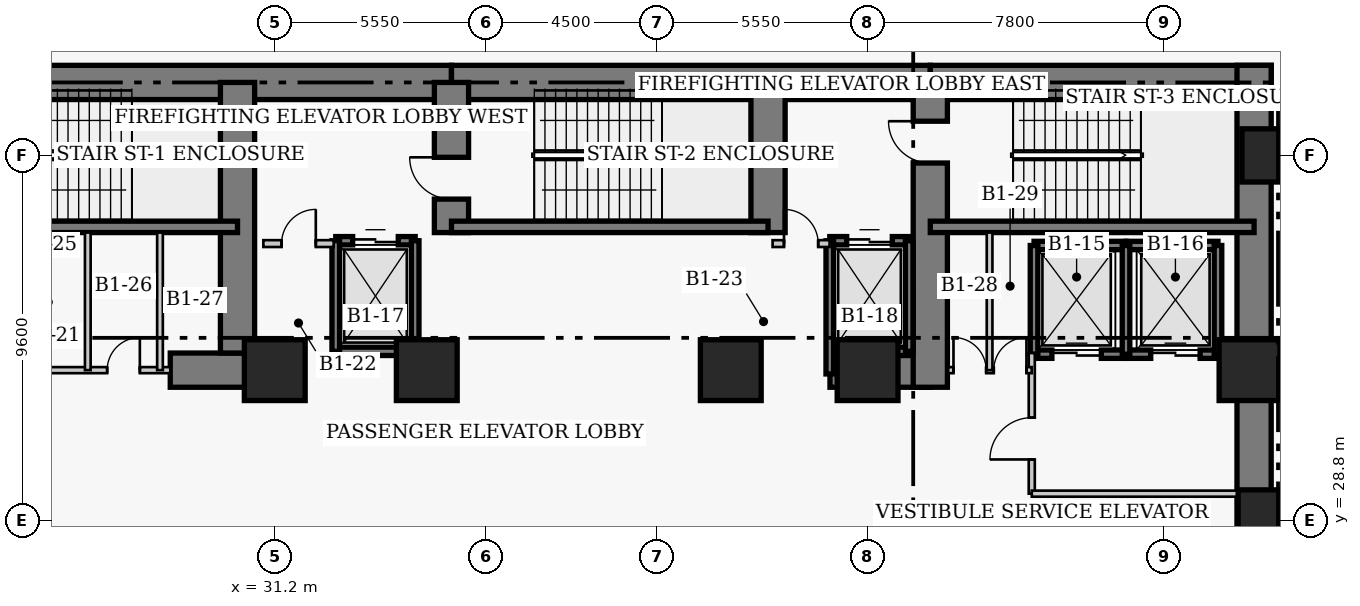
"""IFC4 building model, lengths in metres.
Left out: names, types, materials, properties, quantities, classifications, styles, units other than length and angle.
Written with IfcOpenShell. Run it as: python <this file> out.ifc"""

import sys

from ifc_helpers import new_model, si_unit, direction, frame, frame_2d, origin, origin_2d, place, context, subcontext, project, spatial, rectangle, extrude, element, fill, save


model = new_model("IFC4")
c1 = context("Model", 3, precision=1e-05, world=origin(), true_north=direction((0.0, 1.0)))
c2 = subcontext(c1, "Body", "Model", "MODEL_VIEW")
j1 = project(units=[si_unit("LENGTHUNIT", "METRE"), si_unit("PLANEANGLEUNIT", "RADIAN")], contexts=[c1])
p1 = place(None, origin())
s1 = spatial("IfcSite", under=j1, at=p1, CompositionType="ELEMENT")
p2 = place(p1, origin())
s2 = spatial("IfcBuilding", under=s1, at=p2, CompositionType="ELEMENT")
p3 = place(p2, frame((0.0, 0.0, -4.5)))
s3 = spatial("IfcBuildingStorey", under=s2, at=p3, CompositionType="ELEMENT", Elevation=-4.5)
p4 = place(p3, frame((21.45, 40.32, 0.0), z_axis=(0.0, 0.0, 1.0), x_axis=(1.0, 0.0, 0.0)))
e1 = element("IfcWall", 1, at=p4, inside=s3, PredefinedType="SHEAR", context=c2, shape_type="SweptSolid", body=[
    extrude(rectangle(XDim=14.4, YDim=0.9, at=frame_2d((7.2, 0.0))), origin(), (0.0, 0.0, 1.0), 4.5),
])
p5 = place(p3, frame((35.85, 40.32, 0.0), z_axis=(0.0, 0.0, 1.0), x_axis=(1.0, 0.0, 0.0)))
e2 = element("IfcWall", 2, at=p5, inside=s3, PredefinedType="SHEAR", context=c2, shape_type="SweptSolid", body=[
    extrude(rectangle(XDim=12.6, YDim=0.9, at=frame_2d((6.3, 0.0))), origin(), (0.0, 0.0, 1.0), 4.5),
])
p6 = place(p3, frame((48.45, 40.32, 0.0), z_axis=(0.0, 0.0, 1.0), x_axis=(1.0, 0.0, 0.0)))
e3 = element("IfcWall", 3, at=p6, inside=s3, PredefinedType="SHEAR", context=c2, shape_type="SweptSolid", body=[
    extrude(rectangle(XDim=8.97, YDim=0.9, at=frame_2d((4.485, 0.0))), origin(), (0.0, 0.0, 1.0), 4.5),
])
p7 = place(p3, frame((56.97, 27.05, 0.0), z_axis=(0.0, 0.0, 1.0), x_axis=(0.0, 1.0, 0.0)))
e4 = element("IfcWall", 4, at=p7, inside=s3, PredefinedType="SHEAR", context=c2, shape_type="SweptSolid", body=[
    extrude(rectangle(XDim=13.72, YDim=0.9, at=frame_2d((6.86, 0.0))), origin(), (0.0, 0.0, 1.0), 4.5),
])
p8 = place(p3, frame((28.45, 32.75, 0.0), z_axis=(0.0, 0.0, 1.0), x_axis=(1.0, 0.0, 0.0)))
e5 = element("IfcWall", 5, at=p8, inside=s3, PredefinedType="SHEAR", context=c2, shape_type="SweptSolid", body=[
    extrude(rectangle(XDim=2.4, YDim=0.9, at=frame_2d((1.2, 0.0))), origin(), (0.0, 0.0, 1.0), 4.5),
])
p9 = place(p3, frame((45.81, 32.75, 0.0), z_axis=(0.0, 0.0, 1.0), x_axis=(1.0, 0.0, 0.0)))
e6 = element("IfcWall", 6, at=p9, inside=s3, PredefinedType="SHEAR", context=c2, shape_type="SweptSolid", body=[
    extrude(rectangle(XDim=2.64, YDim=0.9, at=frame_2d((1.32, 0.0))), origin(), (0.0, 0.0, 1.0), 4.5),
])
p10 = place(p3, frame((30.22, 33.2, 0.0), z_axis=(0.0, 0.0, 1.0), x_axis=(0.0, 1.0, 0.0)))
e7 = element("IfcWall", 7, at=p10, inside=s3, PredefinedType="SHEAR", context=c2, shape_type="SweptSolid", body=[
    extrude(rectangle(XDim=7.12, YDim=0.9, at=frame_2d((3.56, 0.0))), origin(), (0.0, 0.0, 1.0), 4.5),
])
p11 = place(p3, frame((35.85, 36.37, 0.0), z_axis=(0.0, 0.0, 1.0), x_axis=(0.0, 1.0, 0.0)))
e8 = element("IfcWall", 8, at=p11, inside=s3, PredefinedType="SHEAR", context=c2, shape_type="SweptSolid", body=[
    extrude(rectangle(XDim=3.95, YDim=0.9, at=frame_2d((1.975, 0.0))), origin(), (0.0, 0.0, 1.0), 4.5),
])
p12 = place(p11, frame((0.88, 0.0, 0.0)))
e9 = element("IfcOpeningElement", 9, at=p12, cuts=e8, PredefinedType="OPENING", context=c2, shape_type="SweptSolid", body=[
    extrude(rectangle(XDim=1.1, YDim=2.15, at=frame_2d((0.55, 1.075))), frame((0.0, 0.46, 0.0), z_axis=(0.0, -1.0, 0.0), x_axis=(1.0, 0.0, 0.0)), (0.0, 0.0, 1.0), 0.92),
])
p13 = place(p3, frame((44.18, 36.37, 0.0), z_axis=(0.0, 0.0, 1.0), x_axis=(0.0, 1.0, 0.0)))
e10 = element("IfcWall", 10, at=p13, inside=s3, PredefinedType="SHEAR", context=c2, shape_type="SweptSolid", body=[
    extrude(rectangle(XDim=3.95, YDim=0.9, at=frame_2d((1.975, 0.0))), origin(), (0.0, 0.0, 1.0), 4.5),
])
p14 = place(p3, frame((48.45, 32.3, 0.0), z_axis=(0.0, 0.0, 1.0), x_axis=(0.0, 1.0, 0.0)))
e11 = element("IfcWall", 11, at=p14, inside=s3, PredefinedType="SHEAR", context=c2, shape_type="SweptSolid", body=[
    extrude(rectangle(XDim=8.02, YDim=0.9, at=frame_2d((4.01, 0.0))), origin(), (0.0, 0.0, 1.0), 4.5),
])
p15 = place(p14, frame((5.9, 0.0, 0.0)))
e12 = element("IfcOpeningElement", 12, at=p15, cuts=e11, PredefinedType="OPENING", context=c2, shape_type="SweptSolid", body=[
    extrude(rectangle(XDim=1.1, YDim=2.15, at=frame_2d((0.55, 1.075))), frame((0.0, 0.46, 0.0), z_axis=(0.0, -1.0, 0.0), x_axis=(1.0, 0.0, 0.0)), (0.0, 0.0, 1.0), 0.92),
])
p16 = place(p3, frame((21.9, 36.52, 0.0), z_axis=(0.0, 0.0, 1.0), x_axis=(1.0, 0.0, 0.0)))
e13 = element("IfcWall", 13, at=p16, inside=s3, PredefinedType="SHEAR", context=c2, shape_type="SweptSolid", body=[
    extrude(rectangle(XDim=8.32, YDim=0.3, at=frame_2d((4.16, 0.0))), origin(), (0.0, 0.0, 1.0), 4.5),
])
p17 = place(p16, frame((0.9, 0.0, 0.0)))
e14 = element("IfcOpeningElement", 14, at=p17, cuts=e13, PredefinedType="OPENING", context=c2, shape_type="SweptSolid", body=[
    extrude(rectangle(XDim=1.1, YDim=2.15, at=frame_2d((0.55, 1.075))), frame((0.0, 0.16, 0.0), z_axis=(0.0, -1.0, 0.0), x_axis=(1.0, 0.0, 0.0)), (0.0, 0.0, 1.0), 0.32),
])
p18 = place(p3, frame((35.85, 36.52, 0.0), z_axis=(0.0, 0.0, 1.0), x_axis=(1.0, 0.0, 0.0)))
e15 = element("IfcWall", 15, at=p18, inside=s3, PredefinedType="SHEAR", context=c2, shape_type="SweptSolid", body=[
    extrude(rectangle(XDim=8.33, YDim=0.3, at=frame_2d((4.165, 0.0))), origin(), (0.0, 0.0, 1.0), 4.5),
])
p19 = place(p3, frame((48.45, 36.52, 0.0), z_axis=(0.0, 0.0, 1.0), x_axis=(1.0, 0.0, 0.0)))
e16 = element("IfcWall", 16, at=p19, inside=s3, PredefinedType="SHEAR", context=c2, shape_type="SweptSolid", body=[
    extrude(rectangle(XDim=8.52, YDim=0.3, at=frame_2d((4.26, 0.0))), origin(), (0.0, 0.0, 1.0), 4.5),
])
p20 = place(p3, frame((57.35, 28.8, 0.0), z_axis=(0.0, 0.0, 1.0), x_axis=(1.0, 0.0, 0.0)))
e17 = element("IfcColumn", 17, at=p20, inside=s3, PredefinedType="COLUMN", context=c2, shape_type="SweptSolid", body=[
    extrude(rectangle(XDim=1.6, YDim=1.6, at=origin_2d()), origin(), (0.0, 0.0, 1.0), 4.5),
])
p21 = place(p3, frame((57.35, 38.4, 0.0), z_axis=(0.0, 0.0, 1.0), x_axis=(1.0, 0.0, 0.0)))
e18 = element("IfcColumn", 18, at=p21, inside=s3, PredefinedType="COLUMN", context=c2, shape_type="SweptSolid", body=[
    extrude(rectangle(XDim=1.4, YDim=1.4, at=origin_2d()), origin(), (0.0, 0.0, 1.0), 4.5),
])
for number, where, z_axis, x_axis in (
    (19, (31.2, 32.75, 0.0), (0.0, 0.0, 1.0), (1.0, 0.0, 0.0)),
    (20, (35.2, 32.75, 0.0), (0.0, 0.0, 1.0), (1.0, 0.0, 0.0)),
    (21, (43.2, 32.75, 0.0), (0.0, 0.0, 1.0), (1.0, 0.0, 0.0)),
    (22, (46.8, 32.75, 0.0), (0.0, 0.0, 1.0), (1.0, 0.0, 0.0)),
    (23, (56.85, 32.75, 0.0), (0.0, 0.0, 1.0), (1.0, 0.0, 0.0)),
):
    element("IfcColumn", number, at=place(p3, frame(where, z_axis=z_axis, x_axis=x_axis)), inside=s3, PredefinedType="COLUMN", context=c2, shape_type="SweptSolid", body=[
        extrude(rectangle(XDim=1.6, YDim=1.6, at=origin_2d()), origin(), (0.0, 0.0, 1.0), 4.5),
    ])
p22 = place(p3, frame((51.18, 36.03, 0.0), z_axis=(0.0, 0.0, 1.0), x_axis=(1.0, 0.0, 0.0)))
e24 = element("IfcWall", 24, at=p22, inside=s3, PredefinedType="SHEAR", context=c2, shape_type="SweptSolid", body=[
    extrude(rectangle(XDim=2.42, YDim=0.22, at=frame_2d((1.21, 0.0))), origin(), (0.0, 0.0, 1.0), 4.5),
])
p23 = place(p3, frame((51.18, 33.17, 0.0), z_axis=(0.0, 0.0, 1.0), x_axis=(1.0, 0.0, 0.0)))
e25 = element("IfcWall", 25, at=p23, inside=s3, PredefinedType="SHEAR", context=c2, shape_type="SweptSolid", body=[
    extrude(rectangle(XDim=2.42, YDim=0.22, at=frame_2d((1.21, 0.0))), origin(), (0.0, 0.0, 1.0), 4.5),
])
p24 = place(p23, frame((0.47, 0.0, 0.0)))
e26 = element("IfcOpeningElement", 26, at=p24, cuts=e25, PredefinedType="OPENING", context=c2, shape_type="SweptSolid", body=[
    extrude(rectangle(XDim=1.3, YDim=2.15, at=frame_2d((0.65, 1.075))), frame((0.0, 0.12, 0.0), z_axis=(0.0, -1.0, 0.0), x_axis=(1.0, 0.0, 0.0)), (0.0, 0.0, 1.0), 0.24),
])
p25 = place(p3, frame((51.18, 33.17, 0.0), z_axis=(0.0, 0.0, 1.0), x_axis=(0.0, 1.0, 0.0)))
e27 = element("IfcWall", 27, at=p25, inside=s3, PredefinedType="SHEAR", context=c2, shape_type="SweptSolid", body=[
    extrude(rectangle(XDim=2.86, YDim=0.2, at=frame_2d((1.43, 0.0))), origin(), (0.0, 0.0, 1.0), 4.5),
])
p26 = place(p3, frame((53.6, 36.03, 0.0), z_axis=(0.0, 0.0, 1.0), x_axis=(1.0, 0.0, 0.0)))
e28 = element("IfcWall", 28, at=p26, inside=s3, PredefinedType="SHEAR", context=c2, shape_type="SweptSolid", body=[
    extrude(rectangle(XDim=2.42, YDim=0.22, at=frame_2d((1.21, 0.0))), origin(), (0.0, 0.0, 1.0), 4.5),
])
p27 = place(p3, frame((53.6, 33.17, 0.0), z_axis=(0.0, 0.0, 1.0), x_axis=(1.0, 0.0, 0.0)))
e29 = element("IfcWall", 29, at=p27, inside=s3, PredefinedType="SHEAR", context=c2, shape_type="SweptSolid", body=[
    extrude(rectangle(XDim=2.42, YDim=0.22, at=frame_2d((1.21, 0.0))), origin(), (0.0, 0.0, 1.0), 4.5),
])
p28 = place(p27, frame((0.65, 0.0, 0.0)))
e30 = element("IfcOpeningElement", 30, at=p28, cuts=e29, PredefinedType="OPENING", context=c2, shape_type="SweptSolid", body=[
    extrude(rectangle(XDim=1.3, YDim=2.15, at=frame_2d((0.65, 1.075))), frame((0.0, 0.12, 0.0), z_axis=(0.0, -1.0, 0.0), x_axis=(1.0, 0.0, 0.0)), (0.0, 0.0, 1.0), 0.24),
])
for number, where, z_axis, x_axis in (
    (31, (53.6, 33.17, 0.0), (0.0, 0.0, 1.0), (0.0, 1.0, 0.0)),
    (32, (56.02, 33.17, 0.0), (0.0, 0.0, 1.0), (0.0, 1.0, 0.0)),
):
    element("IfcWall", number, at=place(p3, frame(where, z_axis=z_axis, x_axis=x_axis)), inside=s3, PredefinedType="SHEAR", context=c2, shape_type="SweptSolid", body=[
        extrude(rectangle(XDim=2.86, YDim=0.2, at=frame_2d((1.43, 0.0))), origin(), (0.0, 0.0, 1.0), 4.5),
    ])
p29 = place(p3, frame((32.805, 36.155, 0.0), z_axis=(0.0, 0.0, 1.0), x_axis=(1.0, 0.0, 0.0)))
e33 = element("IfcWall", 33, at=p29, inside=s3, PredefinedType="SHEAR", context=c2, shape_type="SweptSolid", body=[
    extrude(rectangle(XDim=2.09, YDim=0.22, at=frame_2d((1.045, 0.0))), origin(), (0.0, 0.0, 1.0), 4.5),
])
p30 = place(p29, frame((0.445, 0.0, 0.0)))
e34 = element("IfcOpeningElement", 34, at=p30, cuts=e33, PredefinedType="OPENING", context=c2, shape_type="SweptSolid", body=[
    extrude(rectangle(XDim=1.2, YDim=2.15, at=frame_2d((0.6, 1.075))), frame((0.0, 0.12, 0.0), z_axis=(0.0, -1.0, 0.0), x_axis=(1.0, 0.0, 0.0)), (0.0, 0.0, 1.0), 0.24),
])
p31 = place(p3, frame((32.805, 33.245, 0.0), z_axis=(0.0, 0.0, 1.0), x_axis=(1.0, 0.0, 0.0)))
e35 = element("IfcWall", 35, at=p31, inside=s3, PredefinedType="SHEAR", context=c2, shape_type="SweptSolid", body=[
    extrude(rectangle(XDim=2.09, YDim=0.22, at=frame_2d((1.045, 0.0))), origin(), (0.0, 0.0, 1.0), 4.5),
])
for number, where, z_axis, x_axis in (
    (36, (32.805, 33.245, 0.0), (0.0, 0.0, 1.0), (0.0, 1.0, 0.0)),
    (37, (34.895, 33.245, 0.0), (0.0, 0.0, 1.0), (0.0, 1.0, 0.0)),
):
    element("IfcWall", number, at=place(p3, frame(where, z_axis=z_axis, x_axis=x_axis)), inside=s3, PredefinedType="SHEAR", context=c2, shape_type="SweptSolid", body=[
        extrude(rectangle(XDim=2.91, YDim=0.2, at=frame_2d((1.455, 0.0))), origin(), (0.0, 0.0, 1.0), 4.5),
    ])
p32 = place(p3, frame((45.805, 36.155, 0.0), z_axis=(0.0, 0.0, 1.0), x_axis=(1.0, 0.0, 0.0)))
e38 = element("IfcWall", 38, at=p32, inside=s3, PredefinedType="SHEAR", context=c2, shape_type="SweptSolid", body=[
    extrude(rectangle(XDim=2.09, YDim=0.22, at=frame_2d((1.045, 0.0))), origin(), (0.0, 0.0, 1.0), 4.5),
])
p33 = place(p32, frame((0.445, 0.0, 0.0)))
e39 = element("IfcOpeningElement", 39, at=p33, cuts=e38, PredefinedType="OPENING", context=c2, shape_type="SweptSolid", body=[
    extrude(rectangle(XDim=1.2, YDim=2.15, at=frame_2d((0.6, 1.075))), frame((0.0, 0.12, 0.0), z_axis=(0.0, -1.0, 0.0), x_axis=(1.0, 0.0, 0.0)), (0.0, 0.0, 1.0), 0.24),
])
p34 = place(p3, frame((45.805, 33.245, 0.0), z_axis=(0.0, 0.0, 1.0), x_axis=(1.0, 0.0, 0.0)))
e40 = element("IfcWall", 40, at=p34, inside=s3, PredefinedType="SHEAR", context=c2, shape_type="SweptSolid", body=[
    extrude(rectangle(XDim=2.09, YDim=0.22, at=frame_2d((1.045, 0.0))), origin(), (0.0, 0.0, 1.0), 4.5),
])
p35 = place(p3, frame((45.805, 32.65, 0.0), z_axis=(0.0, 0.0, 1.0), x_axis=(0.0, 1.0, 0.0)))
e41 = element("IfcWall", 41, at=p35, inside=s3, PredefinedType="SHEAR", context=c2, shape_type="SweptSolid", body=[
    extrude(rectangle(XDim=3.505, YDim=0.2, at=frame_2d((1.752, 0.0))), origin(), (0.0, 0.0, 1.0), 4.5),
])
p36 = place(p3, frame((47.895, 33.245, 0.0), z_axis=(0.0, 0.0, 1.0), x_axis=(0.0, 1.0, 0.0)))
e42 = element("IfcWall", 42, at=p36, inside=s3, PredefinedType="SHEAR", context=c2, shape_type="SweptSolid", body=[
    extrude(rectangle(XDim=2.91, YDim=0.2, at=frame_2d((1.455, 0.0))), origin(), (0.0, 0.0, 1.0), 4.5),
])
p37 = place(p3, frame((30.9, 36.08, 0.0), z_axis=(0.0, 0.0, 1.0), x_axis=(1.0, 0.0, 0.0)))
e43 = element("IfcWall", 43, at=p37, inside=s3, PredefinedType="PARTITIONING", context=c2, shape_type="SweptSolid", body=[
    extrude(rectangle(XDim=1.85, YDim=0.18, at=frame_2d((0.925, 0.0))), origin(), (0.0, 0.0, 1.0), 4.15),
])
p38 = place(p37, frame((0.48, 0.0, 0.0)))
e44 = element("IfcOpeningElement", 44, at=p38, cuts=e43, PredefinedType="OPENING", context=c2, shape_type="SweptSolid", body=[
    extrude(rectangle(XDim=0.9, YDim=2.15, at=frame_2d((0.45, 1.075))), frame((0.0, 0.1, 0.0), z_axis=(0.0, -1.0, 0.0), x_axis=(1.0, 0.0, 0.0)), (0.0, 0.0, 1.0), 0.2),
])
p39 = place(p3, frame((44.3, 36.08, 0.0), z_axis=(0.0, 0.0, 1.0), x_axis=(1.0, 0.0, 0.0)))
e45 = element("IfcWall", 45, at=p39, inside=s3, PredefinedType="PARTITIONING", context=c2, shape_type="SweptSolid", body=[
    extrude(rectangle(XDim=1.5, YDim=0.18, at=frame_2d((0.75, 0.0))), origin(), (0.0, 0.0, 1.0), 4.15),
])
p40 = place(p39, frame((0.3, 0.0, 0.0)))
e46 = element("IfcOpeningElement", 46, at=p40, cuts=e45, PredefinedType="OPENING", context=c2, shape_type="SweptSolid", body=[
    extrude(rectangle(XDim=0.9, YDim=2.15, at=frame_2d((0.45, 1.075))), frame((0.0, 0.1, 0.0), z_axis=(0.0, -1.0, 0.0), x_axis=(1.0, 0.0, 0.0)), (0.0, 0.0, 1.0), 0.2),
])
p41 = place(p3, frame((51.12, 29.5, 0.0), z_axis=(0.0, 0.0, 1.0), x_axis=(0.0, 1.0, 0.0)))
e47 = element("IfcWall", 47, at=p41, inside=s3, PredefinedType="PARTITIONING", context=c2, shape_type="SweptSolid", body=[
    extrude(rectangle(XDim=3.7, YDim=0.16, at=frame_2d((1.85, 0.0))), origin(), (0.0, 0.0, 1.0), 4.15),
])
p42 = place(p41, frame((0.9, 0.0, 0.0)))
e48 = element("IfcOpeningElement", 48, at=p42, cuts=e47, PredefinedType="OPENING", context=c2, shape_type="SweptSolid", body=[
    extrude(rectangle(XDim=1.1, YDim=2.15, at=frame_2d((0.55, 1.075))), frame((0.0, 0.09, 0.0), z_axis=(0.0, -1.0, 0.0), x_axis=(1.0, 0.0, 0.0)), (0.0, 0.0, 1.0), 0.18),
])
p43 = place(p3, frame((51.12, 29.5, 0.0), z_axis=(0.0, 0.0, 1.0), x_axis=(1.0, 0.0, 0.0)))
e49 = element("IfcWall", 49, at=p43, inside=s3, PredefinedType="PARTITIONING", context=c2, shape_type="SweptSolid", body=[
    extrude(rectangle(XDim=5.63, YDim=0.16, at=frame_2d((2.815, 0.0))), origin(), (0.0, 0.0, 1.0), 4.15),
])
p44 = place(p3, frame((24.48, 32.75, 0.0), z_axis=(0.0, 0.0, 1.0), x_axis=(1.0, 0.0, 0.0)))
e50 = element("IfcWall", 50, at=p44, inside=s3, PredefinedType="PARTITIONING", context=c2, shape_type="SweptSolid", body=[
    extrude(rectangle(XDim=3.97, YDim=0.16, at=frame_2d((1.985, 0.0))), origin(), (0.0, 0.0, 1.0), 4.15),
])
p45 = place(p44, frame((2.31, 0.0, 0.0)))
e51 = element("IfcOpeningElement", 51, at=p45, cuts=e50, PredefinedType="OPENING", context=c2, shape_type="SweptSolid", body=[
    extrude(rectangle(XDim=0.86, YDim=2.05, at=frame_2d((0.43, 1.025))), frame((0.0, 0.09, 0.0), z_axis=(0.0, -1.0, 0.0), x_axis=(1.0, 0.0, 0.0)), (0.0, 0.0, 1.0), 0.18),
])
p46 = place(p3, frame((48.92, 32.75, 0.0), z_axis=(0.0, 0.0, 1.0), x_axis=(1.0, 0.0, 0.0)))
e52 = element("IfcWall", 52, at=p46, inside=s3, PredefinedType="PARTITIONING", context=c2, shape_type="SweptSolid", body=[
    extrude(rectangle(XDim=2.2, YDim=0.16, at=frame_2d((1.1, 0.0))), origin(), (0.0, 0.0, 1.0), 4.15),
])
p47 = place(p46, frame((0.14, 0.0, 0.0)))
e53 = element("IfcOpeningElement", 53, at=p47, cuts=e52, PredefinedType="OPENING", context=c2, shape_type="SweptSolid", body=[
    extrude(rectangle(XDim=0.86, YDim=2.05, at=frame_2d((0.43, 1.025))), frame((0.0, 0.09, 0.0), z_axis=(0.0, -1.0, 0.0), x_axis=(1.0, 0.0, 0.0)), (0.0, 0.0, 1.0), 0.18),
])
p48 = place(p46, frame((1.2, 0.0, 0.0)))
e54 = element("IfcOpeningElement", 54, at=p48, cuts=e52, PredefinedType="OPENING", context=c2, shape_type="SweptSolid", body=[
    extrude(rectangle(XDim=0.86, YDim=2.05, at=frame_2d((0.43, 1.025))), frame((0.0, 0.09, 0.0), z_axis=(0.0, -1.0, 0.0), x_axis=(1.0, 0.0, 0.0)), (0.0, 0.0, 1.0), 0.18),
])
for number, where, z_axis, x_axis in (
    (55, (26.28, 32.75, 0.0), (0.0, 0.0, 1.0), (0.0, 1.0, 0.0)),
    (56, (28.18, 32.75, 0.0), (0.0, 0.0, 1.0), (0.0, 1.0, 0.0)),
    (57, (50.01, 32.75, 0.0), (0.0, 0.0, 1.0), (0.0, 1.0, 0.0)),
):
    element("IfcWall", number, at=place(p3, frame(where, z_axis=z_axis, x_axis=x_axis)), inside=s3, PredefinedType="PARTITIONING", context=c2, shape_type="SweptSolid", body=[
        extrude(rectangle(XDim=3.62, YDim=0.15, at=frame_2d((1.81, 0.0))), origin(), (0.0, 0.0, 1.0), 4.15),
    ])
p49 = place(p24, origin())
e58 = element("IfcDoor", 58, at=p49, inside=s3, OperationType="DOUBLE_DOOR_SLIDING", PredefinedType="DOOR", context=c2, shape_type="SweptSolid", body=[
    extrude(rectangle(XDim=1.3, YDim=2.15, at=frame_2d((0.65, 1.075))), frame((0.0, 0.025, 0.0), z_axis=(0.0, -1.0, 0.0), x_axis=(1.0, 0.0, 0.0)), (0.0, 0.0, 1.0), 0.05),
])
fill(e26, e58)
p50 = place(p28, origin())
e59 = element("IfcDoor", 59, at=p50, inside=s3, OperationType="DOUBLE_DOOR_SLIDING", PredefinedType="DOOR", context=c2, shape_type="SweptSolid", body=[
    extrude(rectangle(XDim=1.3, YDim=2.15, at=frame_2d((0.65, 1.075))), frame((0.0, 0.025, 0.0), z_axis=(0.0, -1.0, 0.0), x_axis=(1.0, 0.0, 0.0)), (0.0, 0.0, 1.0), 0.05),
])
fill(e30, e59)
p51 = place(p30, origin())
e60 = element("IfcDoor", 60, at=p51, inside=s3, OperationType="DOUBLE_DOOR_SLIDING", PredefinedType="DOOR", context=c2, shape_type="SweptSolid", body=[
    extrude(rectangle(XDim=1.2, YDim=2.15, at=frame_2d((0.6, 1.075))), frame((0.0, 0.025, 0.0), z_axis=(0.0, -1.0, 0.0), x_axis=(1.0, 0.0, 0.0)), (0.0, 0.0, 1.0), 0.05),
])
fill(e34, e60)
p52 = place(p33, origin())
e61 = element("IfcDoor", 61, at=p52, inside=s3, OperationType="DOUBLE_DOOR_SLIDING", PredefinedType="DOOR", context=c2, shape_type="SweptSolid", body=[
    extrude(rectangle(XDim=1.2, YDim=2.15, at=frame_2d((0.6, 1.075))), frame((0.0, 0.025, 0.0), z_axis=(0.0, -1.0, 0.0), x_axis=(1.0, 0.0, 0.0)), (0.0, 0.0, 1.0), 0.05),
])
fill(e39, e61)
p53 = place(p38, origin())
e62 = element("IfcDoor", 62, at=p53, inside=s3, OperationType="SINGLE_SWING_RIGHT", PredefinedType="DOOR", context=c2, shape_type="SweptSolid", body=[
    extrude(rectangle(XDim=0.9, YDim=2.15, at=frame_2d((0.45, 1.075))), frame((0.0, 0.025, 0.0), z_axis=(0.0, -1.0, 0.0), x_axis=(1.0, 0.0, 0.0)), (0.0, 0.0, 1.0), 0.05),
])
fill(e44, e62)
p54 = place(p40, origin())
e63 = element("IfcDoor", 63, at=p54, inside=s3, OperationType="SINGLE_SWING_LEFT", PredefinedType="DOOR", context=c2, shape_type="SweptSolid", body=[
    extrude(rectangle(XDim=0.9, YDim=2.15, at=frame_2d((0.45, 1.075))), frame((0.0, 0.025, 0.0), z_axis=(0.0, -1.0, 0.0), x_axis=(1.0, 0.0, 0.0)), (0.0, 0.0, 1.0), 0.05),
])
fill(e46, e63)
p55 = place(p42, origin())
e64 = element("IfcDoor", 64, at=p55, inside=s3, OperationType="SINGLE_SWING_LEFT", PredefinedType="DOOR", context=c2, shape_type="SweptSolid", body=[
    extrude(rectangle(XDim=1.1, YDim=2.15, at=frame_2d((0.55, 1.075))), frame((0.0, 0.025, 0.0), z_axis=(0.0, -1.0, 0.0), x_axis=(1.0, 0.0, 0.0)), (0.0, 0.0, 1.0), 0.05),
])
fill(e48, e64)
p56 = place(p45, origin())
e65 = element("IfcDoor", 65, at=p56, inside=s3, OperationType="SINGLE_SWING_RIGHT", PredefinedType="DOOR", context=c2, shape_type="SweptSolid", body=[
    extrude(rectangle(XDim=0.86, YDim=2.05, at=frame_2d((0.43, 1.025))), frame((0.0, 0.025, 0.0), z_axis=(0.0, -1.0, 0.0), x_axis=(1.0, 0.0, 0.0)), (0.0, 0.0, 1.0), 0.05),
])
fill(e51, e65)
p57 = place(p47, origin())
e66 = element("IfcDoor", 66, at=p57, inside=s3, OperationType="SINGLE_SWING_LEFT", PredefinedType="DOOR", context=c2, shape_type="SweptSolid", body=[
    extrude(rectangle(XDim=0.86, YDim=2.05, at=frame_2d((0.43, 1.025))), frame((0.0, 0.025, 0.0), z_axis=(0.0, -1.0, 0.0), x_axis=(1.0, 0.0, 0.0)), (0.0, 0.0, 1.0), 0.05),
])
fill(e53, e66)
p58 = place(p48, origin())
e67 = element("IfcDoor", 67, at=p58, inside=s3, OperationType="SINGLE_SWING_RIGHT", PredefinedType="DOOR", context=c2, shape_type="SweptSolid", body=[
    extrude(rectangle(XDim=0.86, YDim=2.05, at=frame_2d((0.43, 1.025))), frame((0.0, 0.025, 0.0), z_axis=(0.0, -1.0, 0.0), x_axis=(1.0, 0.0, 0.0)), (0.0, 0.0, 1.0), 0.05),
])
fill(e54, e67)
p59 = place(p12, origin())
e68 = element("IfcDoor", 68, at=p59, inside=s3, OperationType="SINGLE_SWING_RIGHT", PredefinedType="DOOR", context=c2, shape_type="SweptSolid", body=[
    extrude(rectangle(XDim=1.1, YDim=2.15, at=frame_2d((0.55, 1.075))), frame((0.0, 0.025, 0.0), z_axis=(0.0, -1.0, 0.0), x_axis=(1.0, 0.0, 0.0)), (0.0, 0.0, 1.0), 0.05),
])
fill(e9, e68)
p60 = place(p15, origin())
e69 = element("IfcDoor", 69, at=p60, inside=s3, OperationType="SINGLE_SWING_RIGHT", PredefinedType="DOOR", context=c2, shape_type="SweptSolid", body=[
    extrude(rectangle(XDim=1.1, YDim=2.15, at=frame_2d((0.55, 1.075))), frame((0.0, 0.025, 0.0), z_axis=(0.0, -1.0, 0.0), x_axis=(1.0, 0.0, 0.0)), (0.0, 0.0, 1.0), 0.05),
])
fill(e12, e69)
save(model, sys.argv[1])
